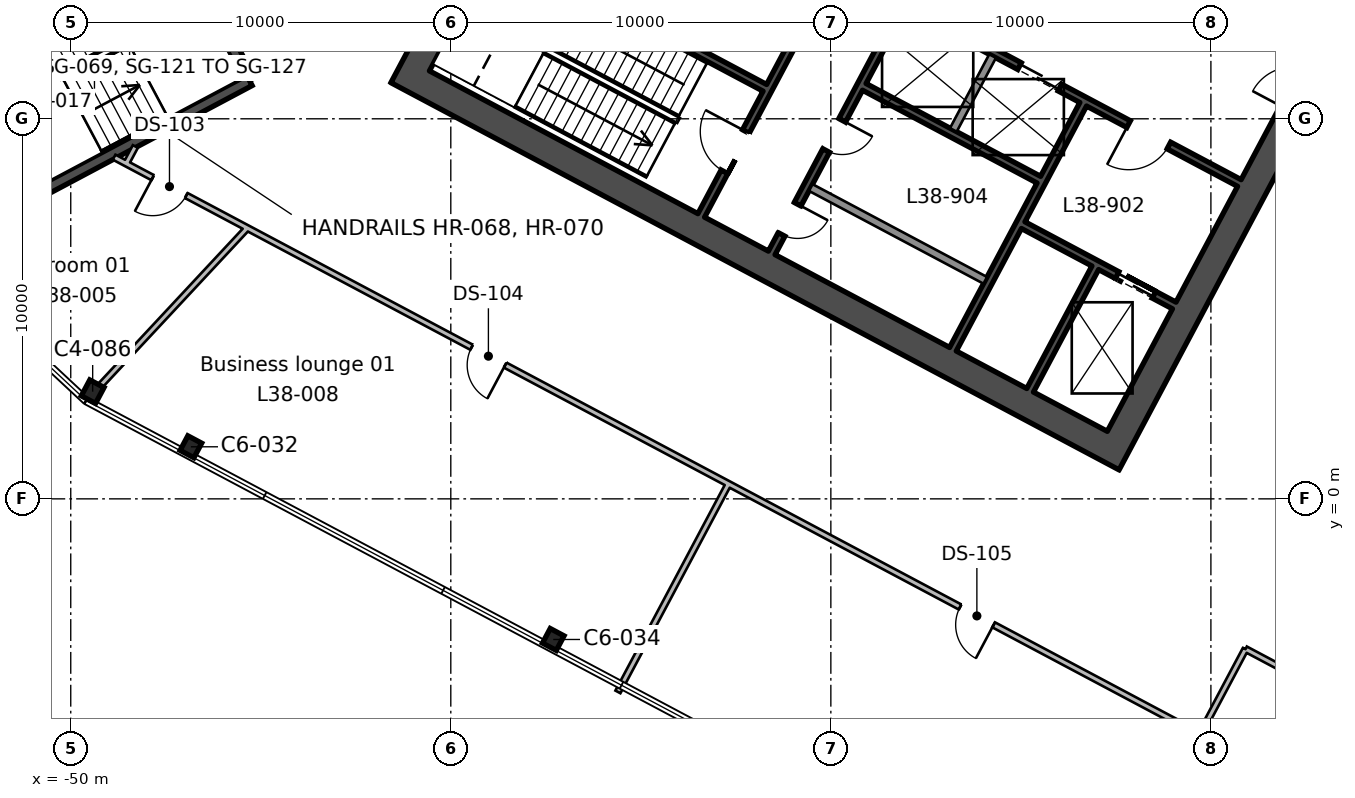
"""IFC4 building model, lengths in metres.
Left out: names, types, materials, properties, quantities, classifications, styles, units other than length and angle.
Written with IfcOpenShell. Run it as: python <this file> out.ifc"""

import sys

from ifc_helpers import new_model, si_unit, direction, frame, frame_2d, origin, origin_2d, place, context, subcontext, project, spatial, rectangle, i_section, extrude, element, fill, save


model = new_model("IFC4")
c1 = context("Model", 3, precision=1e-05, world=origin(), true_north=direction((0.0, 1.0)))
c2 = subcontext(c1, "Body", "Model", "MODEL_VIEW")
j1 = project(units=[si_unit("LENGTHUNIT", "METRE"), si_unit("PLANEANGLEUNIT", "RADIAN")], contexts=[c1])
p1 = place(None, origin())
s1 = spatial("IfcSite", under=j1, at=p1, CompositionType="ELEMENT")
p2 = place(p1, origin())
s2 = spatial("IfcBuilding", under=s1, at=p2, CompositionType="ELEMENT")
p3 = place(p2, frame((0.0, 0.0, 178.2)))
s3 = spatial("IfcBuildingStorey", under=s2, at=p3, CompositionType="ELEMENT", Elevation=178.2)
for number, where, z_axis, x_axis in (
    (1, (-37.304, -3.7, 0.0), (0.0, 0.0, 1.0), (0.883, -0.469, 0.0)),
    (2, (-46.839, 1.37, 0.0), (0.0, 0.0, 1.0), (0.883, -0.469, 0.0)),
):
    element("IfcColumn", number, at=place(p3, frame(where, z_axis=z_axis, x_axis=x_axis)), inside=s3, PredefinedType="COLUMN", context=c2, shape_type="SweptSolid", body=[
        extrude(i_section(OverallWidth=0.412, OverallDepth=0.434, WebThickness=0.036, FlangeThickness=0.057, FilletRadius=0.015, at=origin_2d()), origin(), (0.0, 0.0, 1.0), 5.4),
    ])
p4 = place(p3, frame((-49.423, 2.82, 0.0), z_axis=(0.0, 0.0, 1.0), x_axis=(0.882947592859, -0.469471562786, 0.0)))
e3 = element("IfcColumn", 3, at=p4, inside=s3, PredefinedType="COLUMN", context=c2, shape_type="SweptSolid", body=[
    extrude(i_section(OverallWidth=0.424, OverallDepth=0.475, WebThickness=0.048, FlangeThickness=0.077, FilletRadius=0.015, at=origin_2d()), origin(), (0.0, 0.0, 1.0), 5.4),
])
p5 = place(p3, frame((-13.498, 18.333, 0.0), z_axis=(0.0, 0.0, 1.0), x_axis=(-0.469469918705, -0.88294846703, 0.0)))
e4 = element("IfcWall", 4, at=p5, inside=s3, PredefinedType="SHEAR", context=c2, shape_type="SweptSolid", body=[
    extrude(rectangle(XDim=19.7, YDim=0.75, at=frame_2d((9.85, 0.0))), origin(), (0.0, 0.0, 1.0), 5.4),
])
p6 = place(p5, frame((6.85, 0.0, 0.0)))
e5 = element("IfcOpeningElement", 5, at=p6, cuts=e4, PredefinedType="OPENING", context=c2, shape_type="SweptSolid", body=[
    extrude(rectangle(XDim=2.4, YDim=2.4, at=frame_2d((1.2, 1.2))), frame((0.0, 0.385, 0.0), z_axis=(0.0, -1.0, 0.0), x_axis=(1.0, 0.0, 0.0)), (0.0, 0.0, 1.0), 0.77),
])
p7 = place(p3, frame((-31.996, 28.168, 0.0), z_axis=(0.0, 0.0, 1.0), x_axis=(-0.469479580143, -0.882943329908, 0.0)))
e6 = element("IfcWall", 6, at=p7, inside=s3, PredefinedType="SHEAR", context=c2, shape_type="SweptSolid", body=[
    extrude(rectangle(XDim=19.7, YDim=0.75, at=frame_2d((9.85, 0.0))), origin(), (0.0, 0.0, 1.0), 5.4),
])
p8 = place(p7, frame((10.45, 0.0, 0.0)))
e7 = element("IfcOpeningElement", 7, at=p8, cuts=e6, PredefinedType="OPENING", context=c2, shape_type="SweptSolid", body=[
    extrude(rectangle(XDim=2.4, YDim=2.4, at=frame_2d((1.2, 1.2))), frame((0.0, 0.385, 0.0), z_axis=(0.0, -1.0, 0.0), x_axis=(1.0, 0.0, 0.0)), (0.0, 0.0, 1.0), 0.77),
])
p9 = place(p3, frame((-22.902, 1.446, 0.0), z_axis=(0.0, 0.0, 1.0), x_axis=(-0.88294509198, 0.469476266226, 0.0)))
e8 = element("IfcWall", 8, at=p9, inside=s3, PredefinedType="SHEAR", context=c2, shape_type="SweptSolid", body=[
    extrude(rectangle(XDim=20.2, YDim=0.75, at=frame_2d((10.1, 0.0))), origin(), (0.0, 0.0, 1.0), 5.4),
])
p10 = place(p3, frame((-23.043, 6.08, 0.0), z_axis=(0.0, 0.0, 1.0), x_axis=(-0.469494272526, -0.882935517501, 0.0)))
e9 = element("IfcWall", 9, at=p10, inside=s3, PredefinedType="SHEAR", context=c2, shape_type="SweptSolid", body=[
    extrude(rectangle(XDim=3.65, YDim=0.2, at=frame_2d((1.825, 0.0))), origin(), (0.0, 0.0, 1.0), 5.4),
])
p11 = place(p3, frame((-23.36, 10.382, 0.0), z_axis=(0.0, 0.0, 1.0), x_axis=(-0.469480409012, -0.88294288918, 0.0)))
e10 = element("IfcWall", 10, at=p11, inside=s3, PredefinedType="SHEAR", context=c2, shape_type="SweptSolid", body=[
    extrude(rectangle(XDim=7.3, YDim=0.2, at=frame_2d((3.65, 0.0))), origin(), (0.0, 0.0, 1.0), 5.4),
])
p12 = place(p3, frame((-25.744, 11.65, 0.0), z_axis=(0.0, 0.0, 1.0), x_axis=(-0.469487830541, -0.882938942948, 0.0)))
e11 = element("IfcWall", 11, at=p12, inside=s3, PredefinedType="SOLIDWALL", context=c2, shape_type="SweptSolid", body=[
    extrude(rectangle(XDim=2.2, YDim=0.2, at=frame_2d((1.1, 0.0))), origin(), (0.0, 0.0, 1.0), 5.4),
])
p13 = place(p3, frame((-28.128, 12.917, 0.0), z_axis=(0.0, 0.0, 1.0), x_axis=(-0.469454336211, -0.882956752176, 0.0)))
e12 = element("IfcWall", 12, at=p13, inside=s3, PredefinedType="SHEAR", context=c2, shape_type="SweptSolid", body=[
    extrude(rectangle(XDim=7.3, YDim=0.2, at=frame_2d((3.65, 0.0))), origin(), (0.0, 0.0, 1.0), 5.4),
])
p14 = place(p13, frame((3.35, 0.0, 0.0)))
e13 = element("IfcOpeningElement", 13, at=p14, cuts=e12, PredefinedType="OPENING", context=c2, shape_type="SweptSolid", body=[
    extrude(rectangle(XDim=0.9, YDim=2.1, at=frame_2d((0.45, 1.05))), frame((0.0, 0.11, 0.0), z_axis=(0.0, -1.0, 0.0), x_axis=(1.0, 0.0, 0.0)), (0.0, 0.0, 1.0), 0.22),
])
p15 = place(p13, frame((5.85, 0.0, 0.0)))
e14 = element("IfcOpeningElement", 14, at=p15, cuts=e12, PredefinedType="OPENING", context=c2, shape_type="SweptSolid", body=[
    extrude(rectangle(XDim=0.9, YDim=2.1, at=frame_2d((0.45, 1.05))), frame((0.0, 0.11, 0.0), z_axis=(0.0, -1.0, 0.0), x_axis=(1.0, 0.0, 0.0)), (0.0, 0.0, 1.0), 0.22),
])
p16 = place(p3, frame((-29.982, 13.903, 0.0), z_axis=(0.0, 0.0, 1.0), x_axis=(-0.469454336211, -0.882956752176, 0.0)))
e15 = element("IfcWall", 15, at=p16, inside=s3, PredefinedType="SHEAR", context=c2, shape_type="SweptSolid", body=[
    extrude(rectangle(XDim=7.3, YDim=0.2, at=frame_2d((3.65, 0.0))), origin(), (0.0, 0.0, 1.0), 5.4),
])
p17 = place(p16, frame((4.8, 0.0, 0.0)))
e16 = element("IfcOpeningElement", 16, at=p17, cuts=e15, PredefinedType="OPENING", context=c2, shape_type="SweptSolid", body=[
    extrude(rectangle(XDim=1.2, YDim=2.1, at=frame_2d((0.6, 1.05))), frame((0.0, 0.11, 0.0), z_axis=(0.0, -1.0, 0.0), x_axis=(1.0, 0.0, 0.0)), (0.0, 0.0, 1.0), 0.22),
])
p18 = place(p3, frame((-19.252, 8.311, 0.0), z_axis=(0.0, 0.0, 1.0), x_axis=(-0.882955722218, 0.469456273365, 0.0)))
e17 = element("IfcWall", 17, at=p18, inside=s3, PredefinedType="SHEAR", context=c2, shape_type="SweptSolid", body=[
    extrude(rectangle(XDim=10.0, YDim=0.2, at=frame_2d((5.0, 0.0))), origin(), (0.0, 0.0, 1.0), 5.4),
])
p19 = place(p18, frame((2.1, 0.0, 0.0)))
e18 = element("IfcOpeningElement", 18, at=p19, cuts=e17, PredefinedType="OPENING", context=c2, shape_type="SweptSolid", body=[
    extrude(rectangle(XDim=1.2, YDim=2.1, at=frame_2d((0.6, 1.05))), frame((0.0, 0.11, 0.0), z_axis=(0.0, -1.0, 0.0), x_axis=(1.0, 0.0, 0.0)), (0.0, 0.0, 1.0), 0.22),
])
p20 = place(p18, frame((5.35, 0.0, 0.0)))
e19 = element("IfcOpeningElement", 19, at=p20, cuts=e17, PredefinedType="OPENING", context=c2, shape_type="SweptSolid", body=[
    extrude(rectangle(XDim=1.2, YDim=2.1, at=frame_2d((0.6, 1.05))), frame((0.0, 0.11, 0.0), z_axis=(0.0, -1.0, 0.0), x_axis=(1.0, 0.0, 0.0)), (0.0, 0.0, 1.0), 0.22),
])
p21 = place(p18, frame((8.05, 0.0, 0.0)))
e20 = element("IfcOpeningElement", 20, at=p21, cuts=e17, PredefinedType="OPENING", context=c2, shape_type="SweptSolid", body=[
    extrude(rectangle(XDim=1.2, YDim=2.1, at=frame_2d((0.6, 1.05))), frame((0.0, 0.11, 0.0), z_axis=(0.0, -1.0, 0.0), x_axis=(1.0, 0.0, 0.0)), (0.0, 0.0, 1.0), 0.22),
])
p22 = place(p3, frame((-24.528, 8.398, 0.0), z_axis=(0.0, 0.0, 1.0), x_axis=(-0.882953967957, 0.469459572775, 0.0)))
e21 = element("IfcWall", 21, at=p22, inside=s3, PredefinedType="SHEAR", context=c2, shape_type="SweptSolid", body=[
    extrude(rectangle(XDim=5.2, YDim=0.2, at=frame_2d((2.6, 0.0))), origin(), (0.0, 0.0, 1.0), 5.4),
])
p23 = place(p3, frame((-20.965, 5.088, 0.0), z_axis=(0.0, 0.0, 1.0), x_axis=(-0.882925986334, 0.469512196493, 0.0)))
e22 = element("IfcWall", 22, at=p23, inside=s3, PredefinedType="SHEAR", context=c2, shape_type="SweptSolid", body=[
    extrude(rectangle(XDim=4.5, YDim=0.2, at=frame_2d((2.25, 0.0))), origin(), (0.0, 0.0, 1.0), 5.4),
])
p24 = place(p23, frame((0.6, 0.0, 0.0)))
e23 = element("IfcOpeningElement", 23, at=p24, cuts=e22, PredefinedType="OPENING", context=c2, shape_type="SweptSolid", body=[
    extrude(rectangle(XDim=1.1, YDim=2.1, at=frame_2d((0.55, 1.05))), frame((0.0, 0.11, 0.0), z_axis=(0.0, -1.0, 0.0), x_axis=(1.0, 0.0, 0.0)), (0.0, 0.0, 1.0), 0.22),
])
p25 = place(p3, frame((-31.737, 10.816, 0.0), z_axis=(0.0, 0.0, 1.0), x_axis=(-0.882940221191, 0.469485426614, 0.0)))
e24 = element("IfcWall", 24, at=p25, inside=s3, PredefinedType="SHEAR", context=c2, shape_type="SweptSolid", body=[
    extrude(rectangle(XDim=8.0, YDim=0.2, at=frame_2d((4.0, 0.0))), origin(), (0.0, 0.0, 1.0), 5.4),
])
p26 = place(p3, frame((-25.937, 5.75, 0.0), z_axis=(0.0, 0.0, 1.0), x_axis=(-0.882934506056, 0.469496174655, 0.0)))
e25 = element("IfcWall", 25, at=p26, inside=s3, PredefinedType="SOLIDWALL", context=c2, shape_type="SweptSolid", body=[
    extrude(rectangle(XDim=5.2, YDim=0.2, at=frame_2d((2.6, 0.0))), origin(), (0.0, 0.0, 1.0), 5.4),
])
p27 = place(p3, frame((-47.574, 15.29, 0.0), z_axis=(0.0, 0.0, 1.0), x_axis=(0.469443498566, -0.882962514297, 0.0)))
e26 = element("IfcWall", 26, at=p27, inside=s3, PredefinedType="SHEAR", context=c2, shape_type="SweptSolid", body=[
    extrude(rectangle(XDim=4.85, YDim=0.3, at=frame_2d((2.425, 0.0))), origin(), (0.0, 0.0, 1.0), 5.4),
])
p28 = place(p3, frame((-45.297, 11.007, 0.0), z_axis=(0.0, 0.0, 1.0), x_axis=(-0.882951519127, -0.469464178475, 0.0)))
e27 = element("IfcWall", 27, at=p28, inside=s3, PredefinedType="SHEAR", context=c2, shape_type="SweptSolid", body=[
    extrude(rectangle(XDim=8.3, YDim=0.3, at=frame_2d((4.15, 0.0))), origin(), (0.0, 0.0, 1.0), 5.4),
])
p29 = place(p3, frame((-54.903, 11.393, 0.0), z_axis=(0.0, 0.0, 1.0), x_axis=(0.882939326045, 0.469487110071, 0.0)))
e28 = element("IfcWall", 28, at=p29, inside=s3, PredefinedType="SHEAR", context=c2, shape_type="SweptSolid", body=[
    extrude(rectangle(XDim=8.3, YDim=0.3, at=frame_2d((4.15, 0.0))), origin(), (0.0, 0.0, 1.0), 5.4),
])
p30 = place(p29, frame((6.05, 0.0, 0.0)))
e29 = element("IfcOpeningElement", 29, at=p30, cuts=e28, PredefinedType="OPENING", context=c2, shape_type="SweptSolid", body=[
    extrude(rectangle(XDim=1.9, YDim=2.1, at=frame_2d((0.95, 1.05))), frame((0.0, 0.16, 0.0), z_axis=(0.0, -1.0, 0.0), x_axis=(1.0, 0.0, 0.0)), (0.0, 0.0, 1.0), 0.32),
])
p31 = place(p3, frame((-45.355, 7.127, 0.0), z_axis=(0.0, 0.0, 1.0), x_axis=(-0.682061918603, -0.731294427158, 0.0)))
e30 = element("IfcWall", 30, at=p31, inside=s3, PredefinedType="PARTITIONING", context=c2, shape_type="SweptSolid", body=[
    extrude(rectangle(XDim=5.668, YDim=0.15, at=frame_2d((2.834, 0.0))), origin(), (0.0, 0.0, 1.0), 4.95),
])
p32 = place(p3, frame((-32.692, 0.394, 0.0), z_axis=(0.0, 0.0, 1.0), x_axis=(-0.469533299698, -0.882914763992, 0.0)))
e31 = element("IfcWall", 31, at=p32, inside=s3, PredefinedType="PARTITIONING", context=c2, shape_type="SweptSolid", body=[
    extrude(rectangle(XDim=6.2, YDim=0.15, at=frame_2d((3.1, 0.0))), origin(), (0.0, 0.0, 1.0), 4.95),
])
p33 = place(p3, frame((-48.505, 8.888, 0.0), z_axis=(0.0, 0.0, 1.0), x_axis=(0.471490041511, 0.881871385609, 0.0)))
e32 = element("IfcWall", 32, at=p33, inside=s3, PredefinedType="PARTITIONING", context=c2, shape_type="SweptSolid", body=[
    extrude(rectangle(XDim=0.436, YDim=0.15, at=frame_2d((0.218, 0.0))), origin(), (0.0, 0.0, 1.0), 4.95),
])
p34 = place(p3, frame((-48.859, 8.991, 0.0), z_axis=(0.0, 0.0, 1.0), x_axis=(0.88285411743, -0.469647322293, 0.0)))
e33 = element("IfcWall", 33, at=p34, inside=s3, PredefinedType="PARTITIONING", context=c2, shape_type="SweptSolid", body=[
    extrude(rectangle(XDim=3.301, YDim=0.15, at=frame_2d((1.65, 0.0))), origin(), (0.0, 0.0, 1.0), 4.95),
])
p35 = place(p34, frame((1.15, 0.0, 0.0)))
e34 = element("IfcOpeningElement", 34, at=p35, cuts=e33, PredefinedType="OPENING", context=c2, shape_type="SweptSolid", body=[
    extrude(rectangle(XDim=1.0, YDim=2.1, at=frame_2d((0.5, 1.05))), frame((0.0, 0.085, 0.0), z_axis=(0.0, -1.0, 0.0), x_axis=(1.0, 0.0, 0.0)), (0.0, 0.0, 1.0), 0.17),
])
p36 = place(p3, frame((-31.992, 0.022, 0.0), z_axis=(0.0, 0.0, 1.0), x_axis=(-0.882949241478, 0.469468462172, 0.0)))
e35 = element("IfcWall", 35, at=p36, inside=s3, PredefinedType="PARTITIONING", context=c2, shape_type="SweptSolid", body=[
    extrude(rectangle(XDim=15.803, YDim=0.15, at=frame_2d((7.901, 0.0))), origin(), (0.0, 0.0, 1.0), 4.95),
])
p37 = place(p36, frame((7.449, 0.0, 0.0)))
e36 = element("IfcOpeningElement", 36, at=p37, cuts=e35, PredefinedType="OPENING", context=c2, shape_type="SweptSolid", body=[
    extrude(rectangle(XDim=1.0, YDim=2.1, at=frame_2d((0.5, 1.05))), frame((0.0, 0.085, 0.0), z_axis=(0.0, -1.0, 0.0), x_axis=(1.0, 0.0, 0.0)), (0.0, 0.0, 1.0), 0.17),
])
p38 = place(p3, frame((-20.286, -6.202, 0.0), z_axis=(0.0, 0.0, 1.0), x_axis=(-0.882958308518, 0.469451409007, 0.0)))
e37 = element("IfcWall", 37, at=p38, inside=s3, PredefinedType="PARTITIONING", context=c2, shape_type="SweptSolid", body=[
    extrude(rectangle(XDim=13.258, YDim=0.15, at=frame_2d((6.629, 0.0))), origin(), (0.0, 0.0, 1.0), 4.95),
])
p39 = place(p38, frame((6.15, 0.0, 0.0)))
e38 = element("IfcOpeningElement", 38, at=p39, cuts=e37, PredefinedType="OPENING", context=c2, shape_type="SweptSolid", body=[
    extrude(rectangle(XDim=1.0, YDim=2.1, at=frame_2d((0.5, 1.05))), frame((0.0, 0.085, 0.0), z_axis=(0.0, -1.0, 0.0), x_axis=(1.0, 0.0, 0.0)), (0.0, 0.0, 1.0), 0.17),
])
p40 = place(p3, frame((-20.287, -6.202, 0.0), z_axis=(0.0, 0.0, 1.0), x_axis=(0.469737002115, 0.882806405077, 0.0)))
e39 = element("IfcWall", 39, at=p40, inside=s3, PredefinedType="PARTITIONING", context=c2, shape_type="SweptSolid", body=[
    extrude(rectangle(XDim=2.546, YDim=0.15, at=frame_2d((1.273, 0.0))), origin(), (0.0, 0.0, 1.0), 4.95),
])
p41 = place(p3, frame((-19.089, -3.951, 0.0), z_axis=(0.0, 0.0, 1.0), x_axis=(0.882996405651, -0.46937974776, 0.0)))
e40 = element("IfcWall", 40, at=p41, inside=s3, PredefinedType="PARTITIONING", context=c2, shape_type="SweptSolid", body=[
    extrude(rectangle(XDim=4.531, YDim=0.15, at=frame_2d((2.266, 0.0))), origin(), (0.0, 0.0, 1.0), 4.95),
])
p42 = place(p19, origin())
e41 = element("IfcDoor", 41, at=p42, inside=s3, OperationType="SINGLE_SWING_RIGHT", PredefinedType="DOOR", context=c2, shape_type="SweptSolid", body=[
    extrude(rectangle(XDim=1.2, YDim=2.1, at=frame_2d((0.6, 1.05))), frame((0.0, 0.025, 0.0), z_axis=(0.0, -1.0, 0.0), x_axis=(1.0, 0.0, 0.0)), (0.0, 0.0, 1.0), 0.05),
])
fill(e18, e41)
p43 = place(p17, frame((1.2, 0.0, 0.0), z_axis=(0.0, 0.0, 1.0), x_axis=(-1.0, 0.0, 0.0)))
e42 = element("IfcDoor", 42, at=p43, inside=s3, OperationType="SINGLE_SWING_RIGHT", PredefinedType="DOOR", context=c2, shape_type="SweptSolid", body=[
    extrude(rectangle(XDim=1.2, YDim=2.1, at=frame_2d((0.6, 1.05))), frame((0.0, 0.025, 0.0), z_axis=(0.0, -1.0, 0.0), x_axis=(1.0, 0.0, 0.0)), (0.0, 0.0, 1.0), 0.05),
])
fill(e16, e42)
p44 = place(p20, origin())
e43 = element("IfcDoor", 43, at=p44, inside=s3, OperationType="DOUBLE_DOOR_SLIDING", PredefinedType="DOOR", context=c2, shape_type="SweptSolid", body=[
    extrude(rectangle(XDim=1.2, YDim=2.1, at=frame_2d((0.6, 1.05))), frame((0.0, 0.025, 0.0), z_axis=(0.0, -1.0, 0.0), x_axis=(1.0, 0.0, 0.0)), (0.0, 0.0, 1.0), 0.05),
])
fill(e19, e43)
p45 = place(p24, origin())
e44 = element("IfcDoor", 44, at=p45, inside=s3, OperationType="DOUBLE_DOOR_SLIDING", PredefinedType="DOOR", context=c2, shape_type="SweptSolid", body=[
    extrude(rectangle(XDim=1.1, YDim=2.1, at=frame_2d((0.55, 1.05))), frame((0.0, 0.025, 0.0), z_axis=(0.0, -1.0, 0.0), x_axis=(1.0, 0.0, 0.0)), (0.0, 0.0, 1.0), 0.05),
])
fill(e23, e44)
p46 = place(p14, origin())
e45 = element("IfcDoor", 45, at=p46, inside=s3, OperationType="SINGLE_SWING_LEFT", PredefinedType="DOOR", context=c2, shape_type="SweptSolid", body=[
    extrude(rectangle(XDim=0.9, YDim=2.1, at=frame_2d((0.45, 1.05))), frame((0.0, 0.025, 0.0), z_axis=(0.0, -1.0, 0.0), x_axis=(1.0, 0.0, 0.0)), (0.0, 0.0, 1.0), 0.05),
])
fill(e13, e45)
p47 = place(p15, origin())
e46 = element("IfcDoor", 46, at=p47, inside=s3, OperationType="SINGLE_SWING_LEFT", PredefinedType="DOOR", context=c2, shape_type="SweptSolid", body=[
    extrude(rectangle(XDim=0.9, YDim=2.1, at=frame_2d((0.45, 1.05))), frame((0.0, 0.025, 0.0), z_axis=(0.0, -1.0, 0.0), x_axis=(1.0, 0.0, 0.0)), (0.0, 0.0, 1.0), 0.05),
])
fill(e14, e46)
p48 = place(p35, frame((1.0, 0.0, 0.0), z_axis=(0.0, 0.0, 1.0), x_axis=(-1.0, 0.0, 0.0)))
e47 = element("IfcDoor", 47, at=p48, inside=s3, OperationType="SINGLE_SWING_RIGHT", PredefinedType="DOOR", context=c2, shape_type="SweptSolid", body=[
    extrude(rectangle(XDim=1.0, YDim=2.1, at=frame_2d((0.5, 1.05))), frame((0.0, 0.025, 0.0), z_axis=(0.0, -1.0, 0.0), x_axis=(1.0, 0.0, 0.0)), (0.0, 0.0, 1.0), 0.05),
])
fill(e34, e47)
p49 = place(p37, origin())
e48 = element("IfcDoor", 48, at=p49, inside=s3, OperationType="SINGLE_SWING_LEFT", PredefinedType="DOOR", context=c2, shape_type="SweptSolid", body=[
    extrude(rectangle(XDim=1.0, YDim=2.1, at=frame_2d((0.5, 1.05))), frame((0.0, 0.025, 0.0), z_axis=(0.0, -1.0, 0.0), x_axis=(1.0, 0.0, 0.0)), (0.0, 0.0, 1.0), 0.05),
])
fill(e36, e48)
p50 = place(p39, origin())
e49 = element("IfcDoor", 49, at=p50, inside=s3, OperationType="SINGLE_SWING_LEFT", PredefinedType="DOOR", context=c2, shape_type="SweptSolid", body=[
    extrude(rectangle(XDim=1.0, YDim=2.1, at=frame_2d((0.5, 1.05))), frame((0.0, 0.025, 0.0), z_axis=(0.0, -1.0, 0.0), x_axis=(1.0, 0.0, 0.0)), (0.0, 0.0, 1.0), 0.05),
])
fill(e38, e49)
save(model, sys.argv[1])
